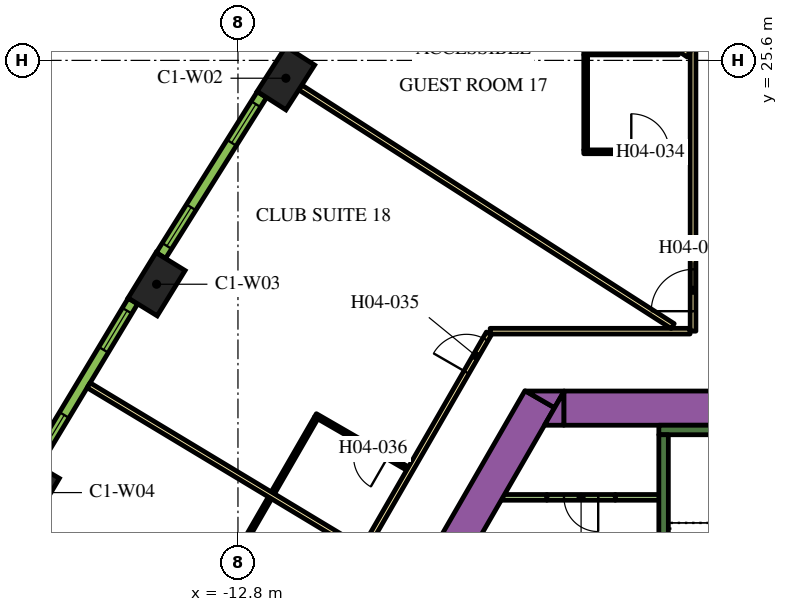
"""IFC4 building model, lengths in metres.
Left out: names, types, materials, properties, quantities, classifications, styles, units other than length and angle.
Written with IfcOpenShell. Run it as: python <this file> out.ifc"""

import sys

from ifc_helpers import new_model, si_unit, direction, frame, frame_2d, origin, origin_2d, place, context, subcontext, project, spatial, polyline, rectangle, outline, extrude, element, fill, save


model = new_model("IFC4")
c1 = context("Model", 3, precision=1e-05, world=origin(), true_north=direction((0.0, 1.0)))
c2 = subcontext(c1, "Body", "Model", "MODEL_VIEW")
j1 = project(units=[si_unit("LENGTHUNIT", "METRE"), si_unit("PLANEANGLEUNIT", "RADIAN")], contexts=[c1])
p1 = place(None, origin())
s1 = spatial("IfcSite", under=j1, at=p1, CompositionType="ELEMENT")
p2 = place(p1, origin())
s2 = spatial("IfcBuilding", under=s1, at=p2, CompositionType="ELEMENT")
p3 = place(p2, frame((0.0, 0.0, 62.7)))
s3 = spatial("IfcBuildingStorey", under=s2, at=p3, CompositionType="ELEMENT", Elevation=62.7)
for number, where, z_axis, x_axis in (
    (1, (-11.539, 25.131, 0.0), (0.0, 0.0, 1.0), (-0.539, -0.842, 0.0)),
    (2, (-14.942, 19.71, 0.0), (0.0, 0.0, 1.0), (-0.524, -0.852, 0.0)),
    (3, (-18.243, 14.228, 0.0), (0.0, 0.0, 1.0), (-0.508, -0.861, 0.0)),
):
    element("IfcColumn", number, at=place(p3, frame(where, z_axis=z_axis, x_axis=x_axis)), inside=s3, PredefinedType="COLUMN", context=c2, shape_type="SweptSolid", body=[
        extrude(rectangle(XDim=1.4, YDim=0.9, at=origin_2d()), origin(), (0.0, 0.0, 1.0), 3.9),
    ])
p4 = place(p3, frame((-14.268, 0.387, 0.0), z_axis=(0.0, 0.0, 1.0), x_axis=(0.499994617707, 0.866028511231, 0.0)))
e4 = element("IfcWall", 4, at=p4, inside=s3, PredefinedType="SOLIDWALL", context=c2, shape_type="SweptSolid", body=[
    extrude(rectangle(XDim=18.817, YDim=0.9, at=frame_2d((9.409, 0.0))), origin(), (0.0, 0.0, 1.0), 3.9),
])
p5 = place(p3, origin())
e5 = element("IfcWall", 5, at=p5, inside=s3, PredefinedType="SOLIDWALL", context=c2, shape_type="SweptSolid", body=[
    extrude(outline(polyline([(-4.215, 16.9), (-4.469, 16.46), (-5.231, 16.9), (-4.215, 16.9)])), origin(), (0.0, 0.0, 1.0), 3.9),
])
p6 = place(p3, frame((-4.224, 16.45, 0.0), z_axis=(0.0, 0.0, 1.0), x_axis=(1.0, 0.0, 0.0)))
e6 = element("IfcWall", 6, at=p6, inside=s3, PredefinedType="SOLIDWALL", context=c2, shape_type="SweptSolid", body=[
    extrude(rectangle(XDim=9.488, YDim=0.9, at=frame_2d((4.744, 0.0))), origin(), (0.0, 0.0, 1.0), 3.9),
])
e7 = element("IfcWall", 7, at=p5, inside=s3, PredefinedType="SOLIDWALL", context=c2, shape_type="SweptSolid", body=[
    extrude(outline(polyline([(-4.734, 16.0), (-4.226, 16.88), (-4.226, 16.0), (-4.734, 16.0)])), origin(), (0.0, 0.0, 1.0), 3.9),
])
p7 = place(p3, frame((-1.725, 15.875, 0.0), z_axis=(0.0, 0.0, 1.0), x_axis=(1.0, 0.0, 0.0)))
e8 = element("IfcWall", 8, at=p7, inside=s3, PredefinedType="SOLIDWALL", context=c2, shape_type="SweptSolid", body=[
    extrude(rectangle(XDim=3.45, YDim=0.25, at=frame_2d((1.725, 0.0))), origin(), (0.0, 0.0, 1.0), 3.9),
])
p8 = place(p3, frame((-1.6, 8.7, 0.0), z_axis=(0.0, 0.0, 1.0), x_axis=(0.0, 1.0, 0.0)))
e9 = element("IfcWall", 9, at=p8, inside=s3, PredefinedType="SOLIDWALL", context=c2, shape_type="SweptSolid", body=[
    extrude(rectangle(XDim=7.05, YDim=0.25, at=frame_2d((3.525, 0.0))), origin(), (0.0, 0.0, 1.0), 3.9),
])
p9 = place(p3, frame((-5.851, 14.102, 0.0), z_axis=(0.0, 0.0, 1.0), x_axis=(1.0, 0.0, 0.0)))
e10 = element("IfcWall", 10, at=p9, inside=s3, PredefinedType="PARTITIONING", context=c2, shape_type="SweptSolid", body=[
    extrude(rectangle(XDim=1.18, YDim=0.15, at=frame_2d((0.59, 0.0))), origin(), (0.0, 0.0, 1.0), 2.75),
])
p10 = place(p3, frame((-2.871, 14.102, 0.0), z_axis=(0.0, 0.0, 1.0), x_axis=(1.0, 0.0, 0.0)))
e11 = element("IfcWall", 11, at=p10, inside=s3, PredefinedType="PARTITIONING", context=c2, shape_type="SweptSolid", body=[
    extrude(rectangle(XDim=1.196, YDim=0.15, at=frame_2d((0.598, 0.0))), origin(), (0.0, 0.0, 1.0), 2.75),
])
p11 = place(p3, frame((-2.871, 14.102, 0.0), z_axis=(0.0, 0.0, 1.0), x_axis=(-1.0, 0.0, 0.0)))
e12 = element("IfcWall", 12, at=p11, inside=s3, PredefinedType="PARTITIONING", context=c2, shape_type="SweptSolid", body=[
    extrude(rectangle(XDim=1.8, YDim=0.15, at=frame_2d((0.9, 0.0))), origin(), (0.0, 0.0, 1.0), 2.75),
])
p12 = place(p11, frame((0.45, 0.0, 0.0)))
e13 = element("IfcOpeningElement", 13, at=p12, cuts=e12, PredefinedType="OPENING", context=c2, shape_type="SweptSolid", body=[
    extrude(rectangle(XDim=0.9, YDim=2.1, at=frame_2d((0.45, 1.05))), frame((0.0, 0.085, 0.0), z_axis=(0.0, -1.0, 0.0), x_axis=(1.0, 0.0, 0.0)), (0.0, 0.0, 1.0), 0.17),
])
p13 = place(p3, frame((-0.825, 18.475, 0.0), z_axis=(0.0, 0.0, 1.0), x_axis=(0.0, 1.0, 0.0)))
e14 = element("IfcWall", 14, at=p13, inside=s3, PredefinedType="PARTITIONING", context=c2, shape_type="SweptSolid", body=[
    extrude(rectangle(XDim=16.224, YDim=0.15, at=frame_2d((8.112, 0.0))), origin(), (0.0, 0.0, 1.0), 2.75),
])
p14 = place(p13, frame((7.949, 0.0, 0.0)))
e15 = element("IfcOpeningElement", 15, at=p14, cuts=e14, PredefinedType="OPENING", context=c2, shape_type="SweptSolid", body=[
    extrude(rectangle(XDim=1.0, YDim=2.1, at=frame_2d((0.5, 1.05))), frame((0.0, 0.085, 0.0), z_axis=(0.0, -1.0, 0.0), x_axis=(1.0, 0.0, 0.0)), (0.0, 0.0, 1.0), 0.17),
])
p15 = place(p13, frame((0.526, 0.0, 0.0)))
e16 = element("IfcOpeningElement", 16, at=p15, cuts=e14, PredefinedType="OPENING", context=c2, shape_type="SweptSolid", body=[
    extrude(rectangle(XDim=1.1, YDim=2.1, at=frame_2d((0.55, 1.05))), frame((0.0, 0.085, 0.0), z_axis=(0.0, -1.0, 0.0), x_axis=(1.0, 0.0, 0.0)), (0.0, 0.0, 1.0), 0.17),
])
p16 = place(p3, frame((-6.163, 18.475, 0.0), z_axis=(0.0, 0.0, 1.0), x_axis=(1.0, 0.0, 0.0)))
e17 = element("IfcWall", 17, at=p16, inside=s3, PredefinedType="PARTITIONING", context=c2, shape_type="SweptSolid", body=[
    extrude(rectangle(XDim=5.258, YDim=0.15, at=frame_2d((2.629, 0.0))), origin(), (0.0, 0.0, 1.0), 2.75),
])
p17 = place(p3, frame((-19.081, -3.9, 0.0), z_axis=(0.0, 0.0, 1.0), x_axis=(0.499998313975, 0.866026377209, 0.0)))
e18 = element("IfcWall", 18, at=p17, inside=s3, PredefinedType="PARTITIONING", context=c2, shape_type="SweptSolid", body=[
    extrude(rectangle(XDim=25.766, YDim=0.15, at=frame_2d((12.883, 0.0))), origin(), (0.0, 0.0, 1.0), 2.75),
])
p18 = place(p17, frame((24.586, 0.0, 0.0)))
e19 = element("IfcOpeningElement", 19, at=p18, cuts=e18, PredefinedType="OPENING", context=c2, shape_type="SweptSolid", body=[
    extrude(rectangle(XDim=1.0, YDim=2.1, at=frame_2d((0.5, 1.05))), frame((0.0, 0.085, 0.0), z_axis=(0.0, -1.0, 0.0), x_axis=(1.0, 0.0, 0.0)), (0.0, 0.0, 1.0), 0.17),
])
p19 = place(p17, frame((9.948, 0.0, 0.0)))
e20 = element("IfcOpeningElement", 20, at=p19, cuts=e18, PredefinedType="OPENING", context=c2, shape_type="SweptSolid", body=[
    extrude(rectangle(XDim=1.0, YDim=2.1, at=frame_2d((0.5, 1.05))), frame((0.0, 0.085, 0.0), z_axis=(0.0, -1.0, 0.0), x_axis=(1.0, 0.0, 0.0)), (0.0, 0.0, 1.0), 0.17),
])
p20 = place(p17, frame((7.782, 0.0, 0.0)))
e21 = element("IfcOpeningElement", 21, at=p20, cuts=e18, PredefinedType="OPENING", context=c2, shape_type="SweptSolid", body=[
    extrude(rectangle(XDim=0.9, YDim=2.1, at=frame_2d((0.45, 1.05))), frame((0.0, 0.085, 0.0), z_axis=(0.0, -1.0, 0.0), x_axis=(1.0, 0.0, 0.0)), (0.0, 0.0, 1.0), 0.17),
])
p21 = place(p17, frame((4.658, 0.0, 0.0)))
e22 = element("IfcOpeningElement", 22, at=p21, cuts=e18, PredefinedType="OPENING", context=c2, shape_type="SweptSolid", body=[
    extrude(rectangle(XDim=0.9, YDim=2.1, at=frame_2d((0.45, 1.05))), frame((0.0, 0.085, 0.0), z_axis=(0.0, -1.0, 0.0), x_axis=(1.0, 0.0, 0.0)), (0.0, 0.0, 1.0), 0.17),
])
p22 = place(p3, frame((-16.729, 17.052, 0.0), z_axis=(0.0, 0.0, 1.0), x_axis=(0.856630606266, -0.515930232113, 0.0)))
e23 = element("IfcWall", 23, at=p22, inside=s3, PredefinedType="PARTITIONING", context=c2, shape_type="SweptSolid", body=[
    extrude(rectangle(XDim=8.355, YDim=0.15, at=frame_2d((4.178, 0.0))), origin(), (0.0, 0.0, 1.0), 2.75),
])
p23 = place(p3, frame((-11.16, 24.888, 0.0), z_axis=(0.0, 0.0, 1.0), x_axis=(0.84199813156, -0.539480441211, 0.0)))
e24 = element("IfcWall", 24, at=p23, inside=s3, PredefinedType="PARTITIONING", context=c2, shape_type="SweptSolid", body=[
    extrude(rectangle(XDim=11.638, YDim=0.15, at=frame_2d((5.819, 0.0))), origin(), (0.0, 0.0, 1.0), 2.75),
])
p24 = place(p3, frame((-7.662, 30.238, 0.0), z_axis=(0.0, 0.0, 1.0), x_axis=(0.831882886825, -0.554951225431, 0.0)))
e25 = element("IfcWall", 25, at=p24, inside=s3, PredefinedType="PARTITIONING", context=c2, shape_type="SweptSolid", body=[
    extrude(rectangle(XDim=8.079, YDim=0.15, at=frame_2d((4.04, 0.0))), origin(), (0.0, 0.0, 1.0), 2.75),
])
p25 = place(p3, frame((-3.7, 23.195, 0.0), z_axis=(0.0, 0.0, 1.0), x_axis=(1.0, 0.0, 0.0)))
e26 = element("IfcWall", 26, at=p25, inside=s3, PredefinedType="PARTITIONING", context=c2, shape_type="SweptSolid", body=[
    extrude(rectangle(XDim=2.8, YDim=0.1, at=frame_2d((1.4, 0.0))), origin(), (0.0, 0.0, 1.0), 2.75),
])
p26 = place(p25, frame((1.25, 0.0, 0.0)))
e27 = element("IfcOpeningElement", 27, at=p26, cuts=e26, PredefinedType="OPENING", context=c2, shape_type="SweptSolid", body=[
    extrude(rectangle(XDim=1.0, YDim=2.1, at=frame_2d((0.5, 1.05))), frame((0.0, 0.06, 0.0), z_axis=(0.0, -1.0, 0.0), x_axis=(1.0, 0.0, 0.0)), (0.0, 0.0, 1.0), 0.12),
])
p27 = place(p3, frame((-3.65, 23.245, 0.0), z_axis=(0.0, 0.0, 1.0), x_axis=(0.0, 1.0, 0.0)))
e28 = element("IfcWall", 28, at=p27, inside=s3, PredefinedType="PARTITIONING", context=c2, shape_type="SweptSolid", body=[
    extrude(rectangle(XDim=2.5, YDim=0.1, at=frame_2d((1.25, 0.0))), origin(), (0.0, 0.0, 1.0), 2.75),
])
p28 = place(p3, frame((-1.21, 25.795, 0.0), z_axis=(0.0, 0.0, 1.0), x_axis=(-1.0, 0.0, 0.0)))
e29 = element("IfcWall", 29, at=p28, inside=s3, PredefinedType="PARTITIONING", context=c2, shape_type="SweptSolid", body=[
    extrude(rectangle(XDim=2.49, YDim=0.1, at=frame_2d((1.245, 0.0))), origin(), (0.0, 0.0, 1.0), 2.75),
])
p29 = place(p3, frame((-8.337, 14.861, 0.0), z_axis=(0.0, 0.0, 1.0), x_axis=(-0.866034573852, 0.49998411664, 0.0)))
e30 = element("IfcWall", 30, at=p29, inside=s3, PredefinedType="PARTITIONING", context=c2, shape_type="SweptSolid", body=[
    extrude(rectangle(XDim=2.8, YDim=0.1, at=frame_2d((1.4, 0.0))), origin(), (0.0, 0.0, 1.0), 2.75),
])
p30 = place(p29, frame((0.6, 0.0, 0.0)))
e31 = element("IfcOpeningElement", 31, at=p30, cuts=e30, PredefinedType="OPENING", context=c2, shape_type="SweptSolid", body=[
    extrude(rectangle(XDim=0.9, YDim=2.1, at=frame_2d((0.45, 1.05))), frame((0.0, 0.06, 0.0), z_axis=(0.0, -1.0, 0.0), x_axis=(1.0, 0.0, 0.0)), (0.0, 0.0, 1.0), 0.12),
])
p31 = place(p3, frame((-10.743, 16.192, 0.0), z_axis=(0.0, 0.0, 1.0), x_axis=(-0.500014167291, -0.866017224141, 0.0)))
e32 = element("IfcWall", 32, at=p31, inside=s3, PredefinedType="PARTITIONING", context=c2, shape_type="SweptSolid", body=[
    extrude(rectangle(XDim=2.27, YDim=0.1, at=frame_2d((1.135, 0.0))), origin(), (0.0, 0.0, 1.0), 2.75),
])
p32 = place(p3, frame((-13.147, 12.029, 0.0), z_axis=(0.0, 0.0, 1.0), x_axis=(0.499939447199, 0.866060361138, 0.0)))
e33 = element("IfcWall", 33, at=p32, inside=s3, PredefinedType="PARTITIONING", context=c2, shape_type="SweptSolid", body=[
    extrude(rectangle(XDim=2.37, YDim=0.1, at=frame_2d((1.185, 0.0))), origin(), (0.0, 0.0, 1.0), 2.75),
])
p33 = place(p3, frame((-8.676, 30.068, 0.0), z_axis=(0.0, 0.0, 1.0), x_axis=(-0.547204617628, -0.836998868845, 0.0)))
e34 = element("IfcWall", 34, at=p33, inside=s3, PredefinedType="SOLIDWALL", context=c2, shape_type="SweptSolid", body=[
    extrude(rectangle(XDim=4.998, YDim=0.29, at=frame_2d((2.499, 0.0))), origin(), (0.0, 0.0, 1.0), 3.65),
])
p34 = place(p33, frame((0.297, 0.0, 0.9)))
e35 = element("IfcOpeningElement", 35, at=p34, cuts=e34, PredefinedType="OPENING", context=c2, shape_type="SweptSolid", body=[
    extrude(rectangle(XDim=1.2, YDim=2.15, at=frame_2d((0.6, 1.075))), frame((0.0, 0.155, 0.0), z_axis=(0.0, -1.0, 0.0), x_axis=(1.0, 0.0, 0.0)), (0.0, 0.0, 1.0), 0.31),
])
p35 = place(p33, frame((3.501, 0.0, 0.9)))
e36 = element("IfcOpeningElement", 36, at=p35, cuts=e34, PredefinedType="OPENING", context=c2, shape_type="SweptSolid", body=[
    extrude(rectangle(XDim=1.2, YDim=2.15, at=frame_2d((0.6, 1.075))), frame((0.0, 0.155, 0.0), z_axis=(0.0, -1.0, 0.0), x_axis=(1.0, 0.0, 0.0)), (0.0, 0.0, 1.0), 0.31),
])
p36 = place(p3, frame((-12.17, 24.699, 0.0), z_axis=(0.0, 0.0, 1.0), x_axis=(-0.531688286542, -0.846940119462, 0.0)))
e37 = element("IfcWall", 37, at=p36, inside=s3, PredefinedType="SOLIDWALL", context=c2, shape_type="SweptSolid", body=[
    extrude(rectangle(XDim=4.998, YDim=0.29, at=frame_2d((2.499, 0.0))), origin(), (0.0, 0.0, 1.0), 3.65),
])
p37 = place(p36, frame((0.297, 0.0, 0.9)))
e38 = element("IfcOpeningElement", 38, at=p37, cuts=e37, PredefinedType="OPENING", context=c2, shape_type="SweptSolid", body=[
    extrude(rectangle(XDim=1.2, YDim=2.15, at=frame_2d((0.6, 1.075))), frame((0.0, 0.155, 0.0), z_axis=(0.0, -1.0, 0.0), x_axis=(1.0, 0.0, 0.0)), (0.0, 0.0, 1.0), 0.31),
])
p38 = place(p36, frame((3.501, 0.0, 0.9)))
e39 = element("IfcOpeningElement", 39, at=p38, cuts=e37, PredefinedType="OPENING", context=c2, shape_type="SweptSolid", body=[
    extrude(rectangle(XDim=1.2, YDim=2.15, at=frame_2d((0.6, 1.075))), frame((0.0, 0.155, 0.0), z_axis=(0.0, -1.0, 0.0), x_axis=(1.0, 0.0, 0.0)), (0.0, 0.0, 1.0), 0.31),
])
p39 = place(p3, frame((-15.564, 19.267, 0.0), z_axis=(0.0, 0.0, 1.0), x_axis=(-0.515938796285, -0.856625448191, 0.0)))
e40 = element("IfcWall", 40, at=p39, inside=s3, PredefinedType="SOLIDWALL", context=c2, shape_type="SweptSolid", body=[
    extrude(rectangle(XDim=4.998, YDim=0.29, at=frame_2d((2.499, 0.0))), origin(), (0.0, 0.0, 1.0), 3.65),
])
p40 = place(p39, frame((0.297, 0.0, 0.9)))
e41 = element("IfcOpeningElement", 41, at=p40, cuts=e40, PredefinedType="OPENING", context=c2, shape_type="SweptSolid", body=[
    extrude(rectangle(XDim=1.2, YDim=2.15, at=frame_2d((0.6, 1.075))), frame((0.0, 0.155, 0.0), z_axis=(0.0, -1.0, 0.0), x_axis=(1.0, 0.0, 0.0)), (0.0, 0.0, 1.0), 0.31),
])
p41 = place(p39, frame((3.501, 0.0, 0.9)))
e42 = element("IfcOpeningElement", 42, at=p41, cuts=e40, PredefinedType="OPENING", context=c2, shape_type="SweptSolid", body=[
    extrude(rectangle(XDim=1.2, YDim=2.15, at=frame_2d((0.6, 1.075))), frame((0.0, 0.155, 0.0), z_axis=(0.0, -1.0, 0.0), x_axis=(1.0, 0.0, 0.0)), (0.0, 0.0, 1.0), 0.31),
])
p42 = place(p12, origin())
e43 = element("IfcDoor", 43, at=p42, inside=s3, OperationType="SINGLE_SWING_LEFT", PredefinedType="DOOR", context=c2, shape_type="SweptSolid", body=[
    extrude(rectangle(XDim=0.9, YDim=2.1, at=frame_2d((0.45, 1.05))), frame((0.0, 0.025, 0.0), z_axis=(0.0, -1.0, 0.0), x_axis=(1.0, 0.0, 0.0)), (0.0, 0.0, 1.0), 0.05),
])
fill(e13, e43)
p43 = place(p15, origin())
e44 = element("IfcDoor", 44, at=p43, inside=s3, OperationType="SINGLE_SWING_LEFT", PredefinedType="DOOR", context=c2, shape_type="SweptSolid", body=[
    extrude(rectangle(XDim=1.1, YDim=2.1, at=frame_2d((0.55, 1.05))), frame((0.0, 0.025, 0.0), z_axis=(0.0, -1.0, 0.0), x_axis=(1.0, 0.0, 0.0)), (0.0, 0.0, 1.0), 0.05),
])
fill(e16, e44)
p44 = place(p26, origin())
e45 = element("IfcDoor", 45, at=p44, inside=s3, OperationType="SINGLE_SWING_LEFT", PredefinedType="DOOR", context=c2, shape_type="SweptSolid", body=[
    extrude(rectangle(XDim=1.0, YDim=2.1, at=frame_2d((0.5, 1.05))), frame((0.0, 0.025, 0.0), z_axis=(0.0, -1.0, 0.0), x_axis=(1.0, 0.0, 0.0)), (0.0, 0.0, 1.0), 0.05),
])
fill(e27, e45)
p45 = place(p18, origin())
e46 = element("IfcDoor", 46, at=p45, inside=s3, OperationType="SINGLE_SWING_RIGHT", PredefinedType="DOOR", context=c2, shape_type="SweptSolid", body=[
    extrude(rectangle(XDim=1.0, YDim=2.1, at=frame_2d((0.5, 1.05))), frame((0.0, 0.025, 0.0), z_axis=(0.0, -1.0, 0.0), x_axis=(1.0, 0.0, 0.0)), (0.0, 0.0, 1.0), 0.05),
])
fill(e19, e46)
p46 = place(p30, origin())
e47 = element("IfcDoor", 47, at=p46, inside=s3, OperationType="SINGLE_SWING_RIGHT", PredefinedType="DOOR", context=c2, shape_type="SweptSolid", body=[
    extrude(rectangle(XDim=0.9, YDim=2.1, at=frame_2d((0.45, 1.05))), frame((0.0, 0.025, 0.0), z_axis=(0.0, -1.0, 0.0), x_axis=(1.0, 0.0, 0.0)), (0.0, 0.0, 1.0), 0.05),
])
fill(e31, e47)
p47 = place(p37, origin())
e48 = element("IfcWindow", 48, at=p47, inside=s3, PartitioningType="DOUBLE_PANEL_VERTICAL", PredefinedType="WINDOW", context=c2, shape_type="SweptSolid", body=[
    extrude(rectangle(XDim=1.2, YDim=2.15, at=frame_2d((0.6, 1.075))), frame((0.0, 0.015, 0.0), z_axis=(0.0, -1.0, 0.0), x_axis=(1.0, 0.0, 0.0)), (0.0, 0.0, 1.0), 0.06),
])
fill(e38, e48)
p48 = place(p38, origin())
e49 = element("IfcWindow", 49, at=p48, inside=s3, PartitioningType="DOUBLE_PANEL_VERTICAL", PredefinedType="WINDOW", context=c2, shape_type="SweptSolid", body=[
    extrude(rectangle(XDim=1.2, YDim=2.15, at=frame_2d((0.6, 1.075))), frame((0.0, 0.015, 0.0), z_axis=(0.0, -1.0, 0.0), x_axis=(1.0, 0.0, 0.0)), (0.0, 0.0, 1.0), 0.06),
])
fill(e39, e49)
p49 = place(p40, origin())
e50 = element("IfcWindow", 50, at=p49, inside=s3, PartitioningType="DOUBLE_PANEL_VERTICAL", PredefinedType="WINDOW", context=c2, shape_type="SweptSolid", body=[
    extrude(rectangle(XDim=1.2, YDim=2.15, at=frame_2d((0.6, 1.075))), frame((0.0, 0.015, 0.0), z_axis=(0.0, -1.0, 0.0), x_axis=(1.0, 0.0, 0.0)), (0.0, 0.0, 1.0), 0.06),
])
fill(e41, e50)
p50 = place(p41, origin())
e51 = element("IfcWindow", 51, at=p50, inside=s3, PartitioningType="DOUBLE_PANEL_VERTICAL", PredefinedType="WINDOW", context=c2, shape_type="SweptSolid", body=[
    extrude(rectangle(XDim=1.2, YDim=2.15, at=frame_2d((0.6, 1.075))), frame((0.0, 0.015, 0.0), z_axis=(0.0, -1.0, 0.0), x_axis=(1.0, 0.0, 0.0)), (0.0, 0.0, 1.0), 0.06),
])
fill(e42, e51)
save(model, sys.argv[1])
